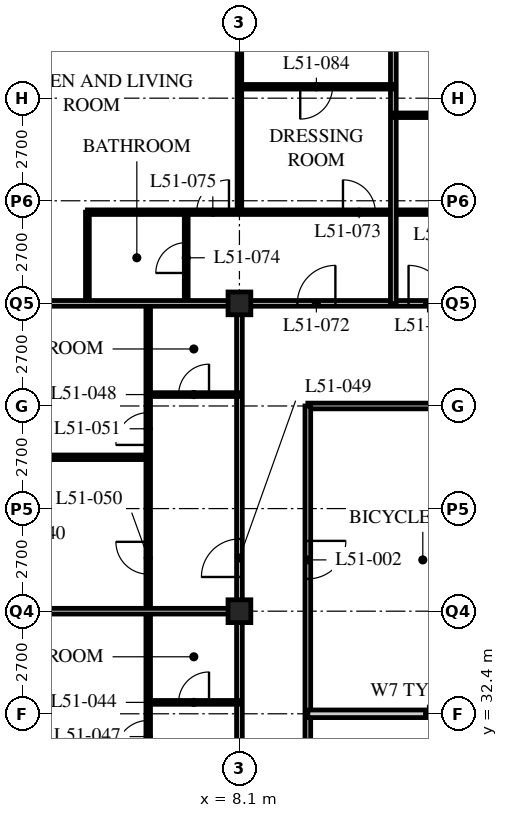
"""IFC4 building model, lengths in metres.
Left out: names, types, materials, properties, quantities, classifications, styles, units other than length and angle.
Written with IfcOpenShell. Run it as: python <this file> out.ifc"""

import sys

from ifc_helpers import new_model, si_unit, direction, frame, frame_2d, origin, origin_2d, place, context, subcontext, project, spatial, rectangle, hollow_rectangle, extrude, element, fill, save


model = new_model("IFC4")
c1 = context("Model", 3, precision=1e-05, world=origin(), true_north=direction((0.0, 1.0)))
c2 = subcontext(c1, "Body", "Model", "MODEL_VIEW")
j1 = project(units=[si_unit("LENGTHUNIT", "METRE"), si_unit("PLANEANGLEUNIT", "RADIAN")], contexts=[c1])
p1 = place(None, origin())
s1 = spatial("IfcSite", under=j1, at=p1, CompositionType="ELEMENT")
p2 = place(p1, origin())
s2 = spatial("IfcBuilding", under=s1, at=p2, CompositionType="ELEMENT")
p3 = place(p2, frame((0.0, 0.0, 199.2)))
s3 = spatial("IfcBuildingStorey", under=s2, at=p3, CompositionType="ELEMENT", Elevation=199.2)
for number, where, z_axis, x_axis in (
    (1, (8.1, 35.1, 0.0), (0.0, 0.0, 1.0), (1.0, 0.0, 0.0)),
    (2, (8.1, 43.2, 0.0), (0.0, 0.0, 1.0), (1.0, 0.0, 0.0)),
):
    element("IfcColumn", number, at=place(p3, frame(where, z_axis=z_axis, x_axis=x_axis)), inside=s3, PredefinedType="COLUMN", context=c2, shape_type="SweptSolid", body=[
        extrude(hollow_rectangle(XDim=0.6, YDim=0.6, WallThickness=0.05, at=origin_2d()), origin(), (0.0, 0.0, 1.0), 3.6),
    ])
p4 = place(p3, frame((8.1, 43.2, 0.0), z_axis=(0.0, 0.0, 1.0), x_axis=(1.0, 0.0, 0.0)))
e3 = element("IfcWall", 3, at=p4, inside=s3, PredefinedType="PARTITIONING", context=c2, shape_type="SweptSolid", body=[
    extrude(rectangle(XDim=40.5, YDim=0.15, at=frame_2d((20.25, 0.0))), origin(), (0.0, 0.0, 1.0), 2.778),
])
p5 = place(p4, frame((4.45, 0.0, 0.0)))
e4 = element("IfcOpeningElement", 4, at=p5, cuts=e3, PredefinedType="OPENING", context=c2, shape_type="SweptSolid", body=[
    extrude(rectangle(XDim=1.0, YDim=2.1, at=frame_2d((0.5, 1.05))), frame((0.0, 0.085, 0.0), z_axis=(0.0, -1.0, 0.0), x_axis=(1.0, 0.0, 0.0)), (0.0, 0.0, 1.0), 0.17),
])
p6 = place(p4, frame((20.65, 0.0, 0.0)))
e5 = element("IfcOpeningElement", 5, at=p6, cuts=e3, PredefinedType="OPENING", context=c2, shape_type="SweptSolid", body=[
    extrude(rectangle(XDim=1.0, YDim=2.1, at=frame_2d((0.5, 1.05))), frame((0.0, 0.085, 0.0), z_axis=(0.0, -1.0, 0.0), x_axis=(1.0, 0.0, 0.0)), (0.0, 0.0, 1.0), 0.17),
])
p7 = place(p4, frame((28.75, 0.0, 0.0)))
e6 = element("IfcOpeningElement", 6, at=p7, cuts=e3, PredefinedType="OPENING", context=c2, shape_type="SweptSolid", body=[
    extrude(rectangle(XDim=1.0, YDim=2.1, at=frame_2d((0.5, 1.05))), frame((0.0, 0.085, 0.0), z_axis=(0.0, -1.0, 0.0), x_axis=(1.0, 0.0, 0.0)), (0.0, 0.0, 1.0), 0.17),
])
p8 = place(p4, frame((37.975, 0.0, 0.0)))
e7 = element("IfcOpeningElement", 7, at=p8, cuts=e3, PredefinedType="OPENING", context=c2, shape_type="SweptSolid", body=[
    extrude(rectangle(XDim=1.0, YDim=2.1, at=frame_2d((0.5, 1.05))), frame((0.0, 0.085, 0.0), z_axis=(0.0, -1.0, 0.0), x_axis=(1.0, 0.0, 0.0)), (0.0, 0.0, 1.0), 0.17),
])
p9 = place(p4, frame((1.525, 0.0, 0.0)))
e8 = element("IfcOpeningElement", 8, at=p9, cuts=e3, PredefinedType="OPENING", context=c2, shape_type="SweptSolid", body=[
    extrude(rectangle(XDim=1.0, YDim=2.1, at=frame_2d((0.5, 1.05))), frame((0.0, 0.085, 0.0), z_axis=(0.0, -1.0, 0.0), x_axis=(1.0, 0.0, 0.0)), (0.0, 0.0, 1.0), 0.17),
])
p10 = place(p3, frame((8.1, 18.9, 0.0), z_axis=(0.0, 0.0, 1.0), x_axis=(0.0, 1.0, 0.0)))
e9 = element("IfcWall", 9, at=p10, inside=s3, PredefinedType="PARTITIONING", context=c2, shape_type="SweptSolid", body=[
    extrude(rectangle(XDim=24.3, YDim=0.15, at=frame_2d((12.15, 0.0))), origin(), (0.0, 0.0, 1.0), 2.778),
])
p11 = place(p10, frame((0.9, 0.0, 0.0)))
e10 = element("IfcOpeningElement", 10, at=p11, cuts=e9, PredefinedType="OPENING", context=c2, shape_type="SweptSolid", body=[
    extrude(rectangle(XDim=1.0, YDim=2.1, at=frame_2d((0.5, 1.05))), frame((0.0, 0.085, 0.0), z_axis=(0.0, -1.0, 0.0), x_axis=(1.0, 0.0, 0.0)), (0.0, 0.0, 1.0), 0.17),
])
p12 = place(p10, frame((9.0, 0.0, 0.0)))
e11 = element("IfcOpeningElement", 11, at=p12, cuts=e9, PredefinedType="OPENING", context=c2, shape_type="SweptSolid", body=[
    extrude(rectangle(XDim=1.0, YDim=2.1, at=frame_2d((0.5, 1.05))), frame((0.0, 0.085, 0.0), z_axis=(0.0, -1.0, 0.0), x_axis=(1.0, 0.0, 0.0)), (0.0, 0.0, 1.0), 0.17),
])
p13 = place(p10, frame((17.1, 0.0, 0.0)))
e12 = element("IfcOpeningElement", 12, at=p13, cuts=e9, PredefinedType="OPENING", context=c2, shape_type="SweptSolid", body=[
    extrude(rectangle(XDim=1.0, YDim=2.1, at=frame_2d((0.5, 1.05))), frame((0.0, 0.085, 0.0), z_axis=(0.0, -1.0, 0.0), x_axis=(1.0, 0.0, 0.0)), (0.0, 0.0, 1.0), 0.17),
])
p14 = place(p3, frame((16.0, 40.5, 0.0), z_axis=(0.0, 0.0, 1.0), x_axis=(-1.0, 0.0, 0.0)))
e13 = element("IfcWall", 13, at=p14, inside=s3, PredefinedType="PARTITIONING", context=c2, shape_type="SweptSolid", body=[
    extrude(rectangle(XDim=6.1, YDim=0.15, at=frame_2d((3.05, 0.0))), origin(), (0.0, 0.0, 1.0), 3.39),
])
p15 = place(p3, frame((9.9, 40.5, 0.0), z_axis=(0.0, 0.0, 1.0), x_axis=(0.0, -1.0, 0.0)))
e14 = element("IfcWall", 14, at=p15, inside=s3, PredefinedType="PARTITIONING", context=c2, shape_type="SweptSolid", body=[
    extrude(rectangle(XDim=19.8, YDim=0.15, at=frame_2d((9.9, 0.0))), origin(), (0.0, 0.0, 1.0), 3.39),
])
p16 = place(p15, frame((11.65, 0.0, 0.0)))
e15 = element("IfcOpeningElement", 15, at=p16, cuts=e14, PredefinedType="OPENING", context=c2, shape_type="SweptSolid", body=[
    extrude(rectangle(XDim=1.0, YDim=2.1, at=frame_2d((0.5, 1.05))), frame((0.0, 0.085, 0.0), z_axis=(0.0, -1.0, 0.0), x_axis=(1.0, 0.0, 0.0)), (0.0, 0.0, 1.0), 0.17),
])
p17 = place(p15, frame((3.55, 0.0, 0.0)))
e16 = element("IfcOpeningElement", 16, at=p17, cuts=e14, PredefinedType="OPENING", context=c2, shape_type="SweptSolid", body=[
    extrude(rectangle(XDim=1.0, YDim=2.1, at=frame_2d((0.5, 1.05))), frame((0.0, 0.085, 0.0), z_axis=(0.0, -1.0, 0.0), x_axis=(1.0, 0.0, 0.0)), (0.0, 0.0, 1.0), 0.17),
])
p18 = place(p3, frame((9.9, 32.4, 0.0), z_axis=(0.0, 0.0, 1.0), x_axis=(1.0, 0.0, 0.0)))
e17 = element("IfcWall", 17, at=p18, inside=s3, PredefinedType="SOLIDWALL", context=c2, shape_type="SweptSolid", body=[
    extrude(rectangle(XDim=6.3, YDim=0.2, at=frame_2d((3.15, 0.0))), origin(), (0.0, 0.0, 1.0), 3.39),
])
p19 = place(p3, frame((5.7, 18.9, 0.0), z_axis=(0.0, 0.0, 1.0), x_axis=(0.0, 1.0, 0.0)))
e18 = element("IfcWall", 18, at=p19, inside=s3, PredefinedType="PARTITIONING", context=c2, shape_type="SweptSolid", body=[
    extrude(rectangle(XDim=24.3, YDim=0.12, at=frame_2d((12.15, 0.0))), origin(), (0.0, 0.0, 1.0), 3.39),
])
p20 = place(p19, frame((0.975, 0.0, 0.0)))
e19 = element("IfcOpeningElement", 19, at=p20, cuts=e18, PredefinedType="OPENING", context=c2, shape_type="SweptSolid", body=[
    extrude(rectangle(XDim=0.85, YDim=2.1, at=frame_2d((0.425, 1.05))), frame((0.0, 0.07, 0.0), z_axis=(0.0, -1.0, 0.0), x_axis=(1.0, 0.0, 0.0)), (0.0, 0.0, 1.0), 0.14),
])
p21 = place(p19, frame((4.375, 0.0, 0.0)))
e20 = element("IfcOpeningElement", 20, at=p21, cuts=e18, PredefinedType="OPENING", context=c2, shape_type="SweptSolid", body=[
    extrude(rectangle(XDim=0.85, YDim=2.1, at=frame_2d((0.425, 1.05))), frame((0.0, 0.07, 0.0), z_axis=(0.0, -1.0, 0.0), x_axis=(1.0, 0.0, 0.0)), (0.0, 0.0, 1.0), 0.14),
])
p22 = place(p19, frame((9.075, 0.0, 0.0)))
e21 = element("IfcOpeningElement", 21, at=p22, cuts=e18, PredefinedType="OPENING", context=c2, shape_type="SweptSolid", body=[
    extrude(rectangle(XDim=0.85, YDim=2.1, at=frame_2d((0.425, 1.05))), frame((0.0, 0.07, 0.0), z_axis=(0.0, -1.0, 0.0), x_axis=(1.0, 0.0, 0.0)), (0.0, 0.0, 1.0), 0.14),
])
p23 = place(p19, frame((12.475, 0.0, 0.0)))
e22 = element("IfcOpeningElement", 22, at=p23, cuts=e18, PredefinedType="OPENING", context=c2, shape_type="SweptSolid", body=[
    extrude(rectangle(XDim=0.85, YDim=2.1, at=frame_2d((0.425, 1.05))), frame((0.0, 0.07, 0.0), z_axis=(0.0, -1.0, 0.0), x_axis=(1.0, 0.0, 0.0)), (0.0, 0.0, 1.0), 0.14),
])
p24 = place(p19, frame((17.175, 0.0, 0.0)))
e23 = element("IfcOpeningElement", 23, at=p24, cuts=e18, PredefinedType="OPENING", context=c2, shape_type="SweptSolid", body=[
    extrude(rectangle(XDim=0.85, YDim=2.1, at=frame_2d((0.425, 1.05))), frame((0.0, 0.07, 0.0), z_axis=(0.0, -1.0, 0.0), x_axis=(1.0, 0.0, 0.0)), (0.0, 0.0, 1.0), 0.14),
])
p25 = place(p19, frame((20.575, 0.0, 0.0)))
e24 = element("IfcOpeningElement", 24, at=p25, cuts=e18, PredefinedType="OPENING", context=c2, shape_type="SweptSolid", body=[
    extrude(rectangle(XDim=0.85, YDim=2.1, at=frame_2d((0.425, 1.05))), frame((0.0, 0.07, 0.0), z_axis=(0.0, -1.0, 0.0), x_axis=(1.0, 0.0, 0.0)), (0.0, 0.0, 1.0), 0.14),
])
p26 = place(p3, frame((8.1, 32.7, 0.0), z_axis=(0.0, 0.0, 1.0), x_axis=(-1.0, 0.0, 0.0)))
e25 = element("IfcWall", 25, at=p26, inside=s3, PredefinedType="PARTITIONING", context=c2, shape_type="SweptSolid", body=[
    extrude(rectangle(XDim=2.4, YDim=0.1, at=frame_2d((1.2, 0.0))), origin(), (0.0, 0.0, 1.0), 3.39),
])
p27 = place(p26, frame((0.8, 0.0, 0.0)))
e26 = element("IfcOpeningElement", 26, at=p27, cuts=e25, PredefinedType="OPENING", context=c2, shape_type="SweptSolid", body=[
    extrude(rectangle(XDim=0.8, YDim=2.1, at=frame_2d((0.4, 1.05))), frame((0.0, 0.06, 0.0), z_axis=(0.0, -1.0, 0.0), x_axis=(1.0, 0.0, 0.0)), (0.0, 0.0, 1.0), 0.12),
])
p28 = place(p3, frame((8.1, 35.1, 0.0), z_axis=(0.0, 0.0, 1.0), x_axis=(-1.0, 0.0, 0.0)))
e27 = element("IfcWall", 27, at=p28, inside=s3, PredefinedType="PARTITIONING", context=c2, shape_type="SweptSolid", body=[
    extrude(rectangle(XDim=7.8, YDim=0.15, at=frame_2d((3.9, 0.0))), origin(), (0.0, 0.0, 1.0), 2.778),
])
p29 = place(p3, frame((8.1, 40.8, 0.0), z_axis=(0.0, 0.0, 1.0), x_axis=(-1.0, 0.0, 0.0)))
e28 = element("IfcWall", 28, at=p29, inside=s3, PredefinedType="PARTITIONING", context=c2, shape_type="SweptSolid", body=[
    extrude(rectangle(XDim=2.4, YDim=0.1, at=frame_2d((1.2, 0.0))), origin(), (0.0, 0.0, 1.0), 3.39),
])
p30 = place(p29, frame((0.8, 0.0, 0.0)))
e29 = element("IfcOpeningElement", 29, at=p30, cuts=e28, PredefinedType="OPENING", context=c2, shape_type="SweptSolid", body=[
    extrude(rectangle(XDim=0.8, YDim=2.1, at=frame_2d((0.4, 1.05))), frame((0.0, 0.06, 0.0), z_axis=(0.0, -1.0, 0.0), x_axis=(1.0, 0.0, 0.0)), (0.0, 0.0, 1.0), 0.12),
])
p31 = place(p3, frame((5.7, 39.15, 0.0), z_axis=(0.0, 0.0, 1.0), x_axis=(-1.0, 0.0, 0.0)))
e30 = element("IfcWall", 30, at=p31, inside=s3, PredefinedType="PARTITIONING", context=c2, shape_type="SweptSolid", body=[
    extrude(rectangle(XDim=5.4, YDim=0.12, at=frame_2d((2.7, 0.0))), origin(), (0.0, 0.0, 1.0), 3.39),
])
p32 = place(p3, frame((6.7, 43.2, 0.0), z_axis=(0.0, 0.0, 1.0), x_axis=(0.0, 1.0, 0.0)))
e31 = element("IfcWall", 31, at=p32, inside=s3, PredefinedType="PARTITIONING", context=c2, shape_type="SweptSolid", body=[
    extrude(rectangle(XDim=2.4, YDim=0.1, at=frame_2d((1.2, 0.0))), origin(), (0.0, 0.0, 1.0), 3.39),
])
p33 = place(p32, frame((0.8, 0.0, 0.0)))
e32 = element("IfcOpeningElement", 32, at=p33, cuts=e31, PredefinedType="OPENING", context=c2, shape_type="SweptSolid", body=[
    extrude(rectangle(XDim=0.8, YDim=2.1, at=frame_2d((0.4, 1.05))), frame((0.0, 0.06, 0.0), z_axis=(0.0, -1.0, 0.0), x_axis=(1.0, 0.0, 0.0)), (0.0, 0.0, 1.0), 0.12),
])
p34 = place(p3, frame((4.1, 43.2, 0.0), z_axis=(0.0, 0.0, 1.0), x_axis=(0.0, 1.0, 0.0)))
e33 = element("IfcWall", 33, at=p34, inside=s3, PredefinedType="PARTITIONING", context=c2, shape_type="SweptSolid", body=[
    extrude(rectangle(XDim=2.4, YDim=0.1, at=frame_2d((1.2, 0.0))), origin(), (0.0, 0.0, 1.0), 3.39),
])
p35 = place(p3, frame((4.1, 45.6, 0.0), z_axis=(0.0, 0.0, 1.0), x_axis=(1.0, 0.0, 0.0)))
e34 = element("IfcWall", 34, at=p35, inside=s3, PredefinedType="PARTITIONING", context=c2, shape_type="SweptSolid", body=[
    extrude(rectangle(XDim=48.5, YDim=0.12, at=frame_2d((24.25, 0.0))), origin(), (0.0, 0.0, 1.0), 3.39),
])
p36 = place(p35, frame((9.025, 0.0, 0.0)))
e35 = element("IfcOpeningElement", 35, at=p36, cuts=e34, PredefinedType="OPENING", context=c2, shape_type="SweptSolid", body=[
    extrude(rectangle(XDim=0.85, YDim=2.1, at=frame_2d((0.425, 1.05))), frame((0.0, 0.07, 0.0), z_axis=(0.0, -1.0, 0.0), x_axis=(1.0, 0.0, 0.0)), (0.0, 0.0, 1.0), 0.14),
])
p37 = place(p35, frame((16.475, 0.0, 0.0)))
e36 = element("IfcOpeningElement", 36, at=p37, cuts=e34, PredefinedType="OPENING", context=c2, shape_type="SweptSolid", body=[
    extrude(rectangle(XDim=0.85, YDim=2.1, at=frame_2d((0.425, 1.05))), frame((0.0, 0.07, 0.0), z_axis=(0.0, -1.0, 0.0), x_axis=(1.0, 0.0, 0.0)), (0.0, 0.0, 1.0), 0.14),
])
p38 = place(p35, frame((20.525, 0.0, 0.0)))
e37 = element("IfcOpeningElement", 37, at=p38, cuts=e34, PredefinedType="OPENING", context=c2, shape_type="SweptSolid", body=[
    extrude(rectangle(XDim=0.85, YDim=2.1, at=frame_2d((0.425, 1.05))), frame((0.0, 0.07, 0.0), z_axis=(0.0, -1.0, 0.0), x_axis=(1.0, 0.0, 0.0)), (0.0, 0.0, 1.0), 0.14),
])
p39 = place(p35, frame((25.225, 0.0, 0.0)))
e38 = element("IfcOpeningElement", 38, at=p39, cuts=e34, PredefinedType="OPENING", context=c2, shape_type="SweptSolid", body=[
    extrude(rectangle(XDim=0.85, YDim=2.1, at=frame_2d((0.425, 1.05))), frame((0.0, 0.07, 0.0), z_axis=(0.0, -1.0, 0.0), x_axis=(1.0, 0.0, 0.0)), (0.0, 0.0, 1.0), 0.14),
])
p40 = place(p35, frame((28.625, 0.0, 0.0)))
e39 = element("IfcOpeningElement", 39, at=p40, cuts=e34, PredefinedType="OPENING", context=c2, shape_type="SweptSolid", body=[
    extrude(rectangle(XDim=0.85, YDim=2.1, at=frame_2d((0.425, 1.05))), frame((0.0, 0.07, 0.0), z_axis=(0.0, -1.0, 0.0), x_axis=(1.0, 0.0, 0.0)), (0.0, 0.0, 1.0), 0.14),
])
p41 = place(p35, frame((33.325, 0.0, 0.0)))
e40 = element("IfcOpeningElement", 40, at=p41, cuts=e34, PredefinedType="OPENING", context=c2, shape_type="SweptSolid", body=[
    extrude(rectangle(XDim=0.85, YDim=2.1, at=frame_2d((0.425, 1.05))), frame((0.0, 0.07, 0.0), z_axis=(0.0, -1.0, 0.0), x_axis=(1.0, 0.0, 0.0)), (0.0, 0.0, 1.0), 0.14),
])
p42 = place(p35, frame((36.725, 0.0, 0.0)))
e41 = element("IfcOpeningElement", 41, at=p42, cuts=e34, PredefinedType="OPENING", context=c2, shape_type="SweptSolid", body=[
    extrude(rectangle(XDim=0.85, YDim=2.1, at=frame_2d((0.425, 1.05))), frame((0.0, 0.07, 0.0), z_axis=(0.0, -1.0, 0.0), x_axis=(1.0, 0.0, 0.0)), (0.0, 0.0, 1.0), 0.14),
])
p43 = place(p35, frame((40.925, 0.0, 0.0)))
e42 = element("IfcOpeningElement", 42, at=p43, cuts=e34, PredefinedType="OPENING", context=c2, shape_type="SweptSolid", body=[
    extrude(rectangle(XDim=0.85, YDim=2.1, at=frame_2d((0.425, 1.05))), frame((0.0, 0.07, 0.0), z_axis=(0.0, -1.0, 0.0), x_axis=(1.0, 0.0, 0.0)), (0.0, 0.0, 1.0), 0.14),
])
p44 = place(p35, frame((44.775, 0.0, 0.0)))
e43 = element("IfcOpeningElement", 43, at=p44, cuts=e34, PredefinedType="OPENING", context=c2, shape_type="SweptSolid", body=[
    extrude(rectangle(XDim=0.85, YDim=2.1, at=frame_2d((0.425, 1.05))), frame((0.0, 0.07, 0.0), z_axis=(0.0, -1.0, 0.0), x_axis=(1.0, 0.0, 0.0)), (0.0, 0.0, 1.0), 0.14),
])
p45 = place(p35, frame((6.725, 0.0, 0.0)))
e44 = element("IfcOpeningElement", 44, at=p45, cuts=e34, PredefinedType="OPENING", context=c2, shape_type="SweptSolid", body=[
    extrude(rectangle(XDim=0.85, YDim=2.1, at=frame_2d((0.425, 1.05))), frame((0.0, 0.07, 0.0), z_axis=(0.0, -1.0, 0.0), x_axis=(1.0, 0.0, 0.0)), (0.0, 0.0, 1.0), 0.14),
])
p46 = place(p35, frame((2.875, 0.0, 0.0)))
e45 = element("IfcOpeningElement", 45, at=p46, cuts=e34, PredefinedType="OPENING", context=c2, shape_type="SweptSolid", body=[
    extrude(rectangle(XDim=0.85, YDim=2.1, at=frame_2d((0.425, 1.05))), frame((0.0, 0.07, 0.0), z_axis=(0.0, -1.0, 0.0), x_axis=(1.0, 0.0, 0.0)), (0.0, 0.0, 1.0), 0.14),
])
p47 = place(p3, frame((8.1, 45.6, 0.0), z_axis=(0.0, 0.0, 1.0), x_axis=(0.0, 1.0, 0.0)))
e46 = element("IfcWall", 46, at=p47, inside=s3, PredefinedType="PARTITIONING", context=c2, shape_type="SweptSolid", body=[
    extrude(rectangle(XDim=9.45, YDim=0.12, at=frame_2d((4.725, 0.0))), origin(), (0.0, 0.0, 1.0), 2.778),
])
p48 = place(p3, frame((0.3, 43.2, 0.0), z_axis=(0.0, 0.0, 1.0), x_axis=(1.0, 0.0, 0.0)))
e47 = element("IfcWall", 47, at=p48, inside=s3, PredefinedType="PARTITIONING", context=c2, shape_type="SweptSolid", body=[
    extrude(rectangle(XDim=7.8, YDim=0.15, at=frame_2d((3.9, 0.0))), origin(), (0.0, 0.0, 1.0), 2.778),
])
p49 = place(p3, frame((12.15, 43.2, 0.0), z_axis=(0.0, 0.0, 1.0), x_axis=(0.0, 1.0, 0.0)))
e48 = element("IfcWall", 48, at=p49, inside=s3, PredefinedType="PARTITIONING", context=c2, shape_type="SweptSolid", body=[
    extrude(rectangle(XDim=15.9, YDim=0.15, at=frame_2d((7.95, 0.0))), origin(), (0.0, 0.0, 1.0), 3.39),
])
p50 = place(p3, frame((12.15, 48.15, 0.0), z_axis=(0.0, 0.0, 1.0), x_axis=(1.0, 0.0, 0.0)))
e49 = element("IfcWall", 49, at=p50, inside=s3, PredefinedType="PARTITIONING", context=c2, shape_type="SweptSolid", body=[
    extrude(rectangle(XDim=8.1, YDim=0.12, at=frame_2d((4.05, 0.0))), origin(), (0.0, 0.0, 1.0), 3.39),
])
p51 = place(p50, frame((1.575, 0.0, 0.0)))
e50 = element("IfcOpeningElement", 50, at=p51, cuts=e49, PredefinedType="OPENING", context=c2, shape_type="SweptSolid", body=[
    extrude(rectangle(XDim=0.85, YDim=2.1, at=frame_2d((0.425, 1.05))), frame((0.0, 0.07, 0.0), z_axis=(0.0, -1.0, 0.0), x_axis=(1.0, 0.0, 0.0)), (0.0, 0.0, 1.0), 0.14),
])
p52 = place(p3, frame((8.1, 48.9, 0.0), z_axis=(0.0, 0.0, 1.0), x_axis=(1.0, 0.0, 0.0)))
e51 = element("IfcWall", 51, at=p52, inside=s3, PredefinedType="PARTITIONING", context=c2, shape_type="SweptSolid", body=[
    extrude(rectangle(XDim=4.05, YDim=0.12, at=frame_2d((2.025, 0.0))), origin(), (0.0, 0.0, 1.0), 3.39),
])
p53 = place(p52, frame((1.6, 0.0, 0.0)))
e52 = element("IfcOpeningElement", 52, at=p53, cuts=e51, PredefinedType="OPENING", context=c2, shape_type="SweptSolid", body=[
    extrude(rectangle(XDim=0.85, YDim=2.1, at=frame_2d((0.425, 1.05))), frame((0.0, 0.07, 0.0), z_axis=(0.0, -1.0, 0.0), x_axis=(1.0, 0.0, 0.0)), (0.0, 0.0, 1.0), 0.14),
])
p54 = place(p17, origin())
e53 = element("IfcDoor", 53, at=p54, inside=s3, OperationType="SINGLE_SWING_LEFT", PredefinedType="DOOR", context=c2, shape_type="SweptSolid", body=[
    extrude(rectangle(XDim=1.0, YDim=2.1, at=frame_2d((0.5, 1.05))), frame((0.0, 0.025, 0.0), z_axis=(0.0, -1.0, 0.0), x_axis=(1.0, 0.0, 0.0)), (0.0, 0.0, 1.0), 0.05),
])
fill(e16, e53)
p55 = place(p5, origin())
e54 = element("IfcDoor", 54, at=p55, inside=s3, OperationType="SINGLE_SWING_LEFT", PredefinedType="DOOR", context=c2, shape_type="SweptSolid", body=[
    extrude(rectangle(XDim=1.0, YDim=2.1, at=frame_2d((0.5, 1.05))), frame((0.0, 0.025, 0.0), z_axis=(0.0, -1.0, 0.0), x_axis=(1.0, 0.0, 0.0)), (0.0, 0.0, 1.0), 0.05),
])
fill(e4, e54)
p56 = place(p27, origin())
e55 = element("IfcDoor", 55, at=p56, inside=s3, OperationType="SINGLE_SWING_RIGHT", PredefinedType="DOOR", context=c2, shape_type="SweptSolid", body=[
    extrude(rectangle(XDim=0.8, YDim=2.1, at=frame_2d((0.4, 1.05))), frame((0.0, 0.025, 0.0), z_axis=(0.0, -1.0, 0.0), x_axis=(1.0, 0.0, 0.0)), (0.0, 0.0, 1.0), 0.05),
])
fill(e26, e55)
p57 = place(p23, origin())
e56 = element("IfcDoor", 56, at=p57, inside=s3, OperationType="SINGLE_SWING_LEFT", PredefinedType="DOOR", context=c2, shape_type="SweptSolid", body=[
    extrude(rectangle(XDim=0.85, YDim=2.1, at=frame_2d((0.425, 1.05))), frame((0.0, 0.025, 0.0), z_axis=(0.0, -1.0, 0.0), x_axis=(1.0, 0.0, 0.0)), (0.0, 0.0, 1.0), 0.05),
])
fill(e22, e56)
p58 = place(p30, origin())
e57 = element("IfcDoor", 57, at=p58, inside=s3, OperationType="SINGLE_SWING_RIGHT", PredefinedType="DOOR", context=c2, shape_type="SweptSolid", body=[
    extrude(rectangle(XDim=0.8, YDim=2.1, at=frame_2d((0.4, 1.05))), frame((0.0, 0.025, 0.0), z_axis=(0.0, -1.0, 0.0), x_axis=(1.0, 0.0, 0.0)), (0.0, 0.0, 1.0), 0.05),
])
fill(e29, e57)
p59 = place(p13, origin())
e58 = element("IfcDoor", 58, at=p59, inside=s3, OperationType="SINGLE_SWING_LEFT", PredefinedType="DOOR", context=c2, shape_type="SweptSolid", body=[
    extrude(rectangle(XDim=1.0, YDim=2.1, at=frame_2d((0.5, 1.05))), frame((0.0, 0.025, 0.0), z_axis=(0.0, -1.0, 0.0), x_axis=(1.0, 0.0, 0.0)), (0.0, 0.0, 1.0), 0.05),
])
fill(e12, e58)
p60 = place(p24, origin())
e59 = element("IfcDoor", 59, at=p60, inside=s3, OperationType="SINGLE_SWING_RIGHT", PredefinedType="DOOR", context=c2, shape_type="SweptSolid", body=[
    extrude(rectangle(XDim=0.85, YDim=2.1, at=frame_2d((0.425, 1.05))), frame((0.0, 0.025, 0.0), z_axis=(0.0, -1.0, 0.0), x_axis=(1.0, 0.0, 0.0)), (0.0, 0.0, 1.0), 0.05),
])
fill(e23, e59)
p61 = place(p25, origin())
e60 = element("IfcDoor", 60, at=p61, inside=s3, OperationType="SINGLE_SWING_LEFT", PredefinedType="DOOR", context=c2, shape_type="SweptSolid", body=[
    extrude(rectangle(XDim=0.85, YDim=2.1, at=frame_2d((0.425, 1.05))), frame((0.0, 0.025, 0.0), z_axis=(0.0, -1.0, 0.0), x_axis=(1.0, 0.0, 0.0)), (0.0, 0.0, 1.0), 0.05),
])
fill(e24, e60)
p62 = place(p9, origin())
e61 = element("IfcDoor", 61, at=p62, inside=s3, OperationType="SINGLE_SWING_RIGHT", PredefinedType="DOOR", context=c2, shape_type="SweptSolid", body=[
    extrude(rectangle(XDim=1.0, YDim=2.1, at=frame_2d((0.5, 1.05))), frame((0.0, 0.025, 0.0), z_axis=(0.0, -1.0, 0.0), x_axis=(1.0, 0.0, 0.0)), (0.0, 0.0, 1.0), 0.05),
])
fill(e8, e61)
p63 = place(p45, origin())
e62 = element("IfcDoor", 62, at=p63, inside=s3, OperationType="SINGLE_SWING_LEFT", PredefinedType="DOOR", context=c2, shape_type="SweptSolid", body=[
    extrude(rectangle(XDim=0.85, YDim=2.1, at=frame_2d((0.425, 1.05))), frame((0.0, 0.025, 0.0), z_axis=(0.0, -1.0, 0.0), x_axis=(1.0, 0.0, 0.0)), (0.0, 0.0, 1.0), 0.05),
])
fill(e44, e62)
p64 = place(p33, origin())
e63 = element("IfcDoor", 63, at=p64, inside=s3, OperationType="SINGLE_SWING_LEFT", PredefinedType="DOOR", context=c2, shape_type="SweptSolid", body=[
    extrude(rectangle(XDim=0.8, YDim=2.1, at=frame_2d((0.4, 1.05))), frame((0.0, 0.025, 0.0), z_axis=(0.0, -1.0, 0.0), x_axis=(1.0, 0.0, 0.0)), (0.0, 0.0, 1.0), 0.05),
])
fill(e32, e63)
p65 = place(p46, origin())
e64 = element("IfcDoor", 64, at=p65, inside=s3, OperationType="SINGLE_SWING_RIGHT", PredefinedType="DOOR", context=c2, shape_type="SweptSolid", body=[
    extrude(rectangle(XDim=0.85, YDim=2.1, at=frame_2d((0.425, 1.05))), frame((0.0, 0.025, 0.0), z_axis=(0.0, -1.0, 0.0), x_axis=(1.0, 0.0, 0.0)), (0.0, 0.0, 1.0), 0.05),
])
fill(e45, e64)
p66 = place(p53, origin())
e65 = element("IfcDoor", 65, at=p66, inside=s3, OperationType="SINGLE_SWING_RIGHT", PredefinedType="DOOR", context=c2, shape_type="SweptSolid", body=[
    extrude(rectangle(XDim=0.85, YDim=2.1, at=frame_2d((0.425, 1.05))), frame((0.0, 0.025, 0.0), z_axis=(0.0, -1.0, 0.0), x_axis=(1.0, 0.0, 0.0)), (0.0, 0.0, 1.0), 0.05),
])
fill(e52, e65)
save(model, sys.argv[1])
